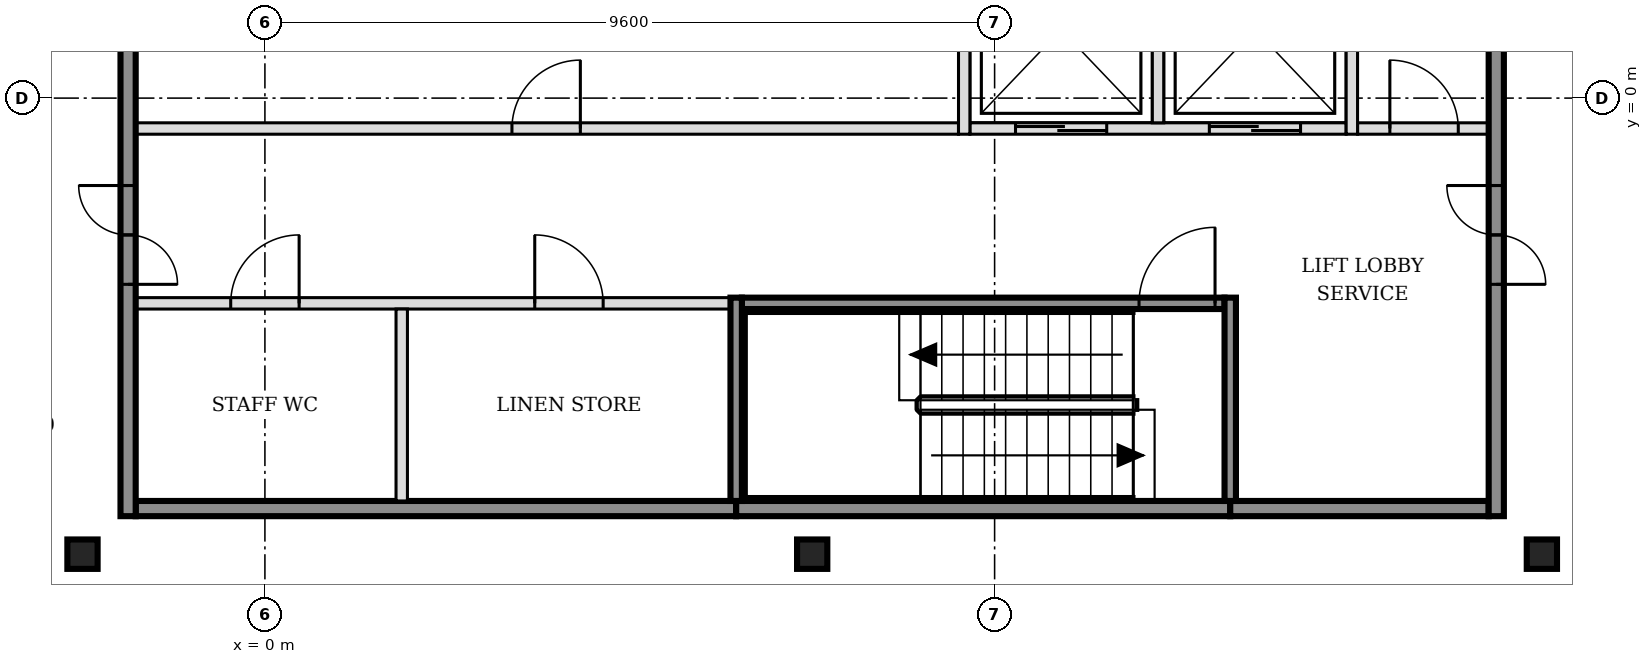
"""IFC4 building model, lengths in metres.
Left out: names, types, materials, properties, quantities, classifications, styles, units other than length and angle.
Written with IfcOpenShell. Run it as: python <this file> out.ifc"""

import sys

from ifc_helpers import new_model, si_unit, direction, frame, frame_2d, origin, origin_2d, place, context, subcontext, project, spatial, rectangle, i_section, extrude, element, fill, save


model = new_model("IFC4")
c1 = context("Model", 3, precision=1e-05, world=origin(), true_north=direction((0.0, 1.0)))
c2 = subcontext(c1, "Body", "Model", "MODEL_VIEW")
j1 = project(units=[si_unit("LENGTHUNIT", "METRE"), si_unit("PLANEANGLEUNIT", "RADIAN")], contexts=[c1])
p1 = place(None, origin())
s1 = spatial("IfcSite", under=j1, at=p1, CompositionType="ELEMENT")
p2 = place(p1, origin())
s2 = spatial("IfcBuilding", under=s1, at=p2, CompositionType="ELEMENT")
p3 = place(p2, frame((0.0, 0.0, 292.2)))
s3 = spatial("IfcBuildingStorey", under=s2, at=p3, CompositionType="ELEMENT", Elevation=292.2)
for number, where, z_axis, x_axis in (
    (1, (-2.4, -6.0, -0.15), (0.0, 0.0, 1.0), (1.0, 0.0, 0.0)),
    (2, (7.2, -6.0, -0.15), (0.0, 0.0, 1.0), (1.0, 0.0, 0.0)),
    (3, (16.8, -6.0, -0.15), (0.0, 0.0, 1.0), (1.0, 0.0, 0.0)),
):
    element("IfcColumn", number, at=place(p3, frame(where, z_axis=z_axis, x_axis=x_axis)), inside=s3, PredefinedType="COLUMN", context=c2, shape_type="SweptSolid", body=[
        extrude(i_section(OverallWidth=0.398, OverallDepth=0.387, WebThickness=0.021, FlangeThickness=0.033, FilletRadius=0.015, at=origin_2d()), origin(), (0.0, 0.0, 1.0), 3.55),
    ])
p4 = place(p3, frame((-1.7, -5.4, 0.0), z_axis=(0.0, 0.0, 1.0), x_axis=(1.0, 0.0, 0.0)))
e4 = element("IfcWall", 4, at=p4, inside=s3, PredefinedType="SOLIDWALL", context=c2, shape_type="SweptSolid", body=[
    extrude(rectangle(XDim=7.9, YDim=0.2, at=frame_2d((3.95, 0.0))), origin(), (0.0, 0.0, 1.0), 3.4),
])
p5 = place(p3, frame((6.2, -5.4, 0.0), z_axis=(0.0, 0.0, 1.0), x_axis=(1.0, 0.0, 0.0)))
e5 = element("IfcWall", 5, at=p5, inside=s3, PredefinedType="SOLIDWALL", context=c2, shape_type="SweptSolid", body=[
    extrude(rectangle(XDim=6.5, YDim=0.2, at=frame_2d((3.25, 0.0))), origin(), (0.0, 0.0, 1.0), 3.4),
])
p6 = place(p3, frame((12.7, -5.4, 0.0), z_axis=(0.0, 0.0, 1.0), x_axis=(1.0, 0.0, 0.0)))
e6 = element("IfcWall", 6, at=p6, inside=s3, PredefinedType="SOLIDWALL", context=c2, shape_type="SweptSolid", body=[
    extrude(rectangle(XDim=3.4, YDim=0.2, at=frame_2d((1.7, 0.0))), origin(), (0.0, 0.0, 1.0), 3.4),
])
p7 = place(p3, frame((-1.7, -2.7, 0.0), z_axis=(0.0, 0.0, 1.0), x_axis=(1.0, 0.0, 0.0)))
e7 = element("IfcWall", 7, at=p7, inside=s3, PredefinedType="PARTITIONING", context=c2, shape_type="SweptSolid", body=[
    extrude(rectangle(XDim=7.825, YDim=0.15, at=frame_2d((3.913, 0.0))), origin(), (0.0, 0.0, 1.0), 3.4),
])
p8 = place(p7, frame((1.25, 0.0, 0.0)))
e8 = element("IfcOpeningElement", 8, at=p8, cuts=e7, PredefinedType="OPENING", context=c2, shape_type="SweptSolid", body=[
    extrude(rectangle(XDim=0.9, YDim=2.1, at=frame_2d((0.45, 1.05))), frame((0.0, 0.085, 0.0), z_axis=(0.0, -1.0, 0.0), x_axis=(1.0, 0.0, 0.0)), (0.0, 0.0, 1.0), 0.17),
])
p9 = place(p7, frame((5.25, 0.0, 0.0)))
e9 = element("IfcOpeningElement", 9, at=p9, cuts=e7, PredefinedType="OPENING", context=c2, shape_type="SweptSolid", body=[
    extrude(rectangle(XDim=0.9, YDim=2.1, at=frame_2d((0.45, 1.05))), frame((0.0, 0.085, 0.0), z_axis=(0.0, -1.0, 0.0), x_axis=(1.0, 0.0, 0.0)), (0.0, 0.0, 1.0), 0.17),
])
p10 = place(p3, frame((6.275, -2.7, 0.0), z_axis=(0.0, 0.0, 1.0), x_axis=(1.0, 0.0, 0.0)))
e10 = element("IfcWall", 10, at=p10, inside=s3, PredefinedType="SOLIDWALL", context=c2, shape_type="SweptSolid", body=[
    extrude(rectangle(XDim=6.35, YDim=0.15, at=frame_2d((3.175, 0.0))), origin(), (0.0, 0.0, 1.0), 3.4),
])
p11 = place(p10, frame((5.225, 0.0, 0.0)))
e11 = element("IfcOpeningElement", 11, at=p11, cuts=e10, PredefinedType="OPENING", context=c2, shape_type="SweptSolid", body=[
    extrude(rectangle(XDim=1.0, YDim=2.1, at=frame_2d((0.5, 1.05))), frame((0.0, 0.085, 0.0), z_axis=(0.0, -1.0, 0.0), x_axis=(1.0, 0.0, 0.0)), (0.0, 0.0, 1.0), 0.17),
])
p12 = place(p3, frame((-1.7, -0.4, 0.0), z_axis=(0.0, 0.0, 1.0), x_axis=(1.0, 0.0, 0.0)))
e12 = element("IfcWall", 12, at=p12, inside=s3, PredefinedType="PARTITIONING", context=c2, shape_type="SweptSolid", body=[
    extrude(rectangle(XDim=10.825, YDim=0.15, at=frame_2d((5.413, 0.0))), origin(), (0.0, 0.0, 1.0), 3.4),
])
p13 = place(p12, frame((4.95, 0.0, 0.0)))
e13 = element("IfcOpeningElement", 13, at=p13, cuts=e12, PredefinedType="OPENING", context=c2, shape_type="SweptSolid", body=[
    extrude(rectangle(XDim=0.9, YDim=2.1, at=frame_2d((0.45, 1.05))), frame((0.0, 0.085, 0.0), z_axis=(0.0, -1.0, 0.0), x_axis=(1.0, 0.0, 0.0)), (0.0, 0.0, 1.0), 0.17),
])
p14 = place(p3, frame((9.275, -0.4, 0.0), z_axis=(0.0, 0.0, 1.0), x_axis=(1.0, 0.0, 0.0)))
e14 = element("IfcWall", 14, at=p14, inside=s3, PredefinedType="SOLIDWALL", context=c2, shape_type="SweptSolid", body=[
    extrude(rectangle(XDim=4.95, YDim=0.15, at=frame_2d((2.475, 0.0))), origin(), (0.0, 0.0, 1.0), 3.4),
])
p15 = place(p14, frame((0.6, 0.0, 0.0)))
e15 = element("IfcOpeningElement", 15, at=p15, cuts=e14, PredefinedType="OPENING", context=c2, shape_type="SweptSolid", body=[
    extrude(rectangle(XDim=1.2, YDim=2.1, at=frame_2d((0.6, 1.05))), frame((0.0, 0.085, 0.0), z_axis=(0.0, -1.0, 0.0), x_axis=(1.0, 0.0, 0.0)), (0.0, 0.0, 1.0), 0.17),
])
p16 = place(p14, frame((3.15, 0.0, 0.0)))
e16 = element("IfcOpeningElement", 16, at=p16, cuts=e14, PredefinedType="OPENING", context=c2, shape_type="SweptSolid", body=[
    extrude(rectangle(XDim=1.2, YDim=2.1, at=frame_2d((0.6, 1.05))), frame((0.0, 0.085, 0.0), z_axis=(0.0, -1.0, 0.0), x_axis=(1.0, 0.0, 0.0)), (0.0, 0.0, 1.0), 0.17),
])
p17 = place(p3, frame((14.375, -0.4, 0.0), z_axis=(0.0, 0.0, 1.0), x_axis=(1.0, 0.0, 0.0)))
e17 = element("IfcWall", 17, at=p17, inside=s3, PredefinedType="PARTITIONING", context=c2, shape_type="SweptSolid", body=[
    extrude(rectangle(XDim=1.725, YDim=0.15, at=frame_2d((0.863, 0.0))), origin(), (0.0, 0.0, 1.0), 3.4),
])
p18 = place(p17, frame((0.425, 0.0, 0.0)))
e18 = element("IfcOpeningElement", 18, at=p18, cuts=e17, PredefinedType="OPENING", context=c2, shape_type="SweptSolid", body=[
    extrude(rectangle(XDim=0.9, YDim=2.1, at=frame_2d((0.45, 1.05))), frame((0.0, 0.085, 0.0), z_axis=(0.0, -1.0, 0.0), x_axis=(1.0, 0.0, 0.0)), (0.0, 0.0, 1.0), 0.17),
])
p19 = place(p3, frame((-1.8, -5.5, 0.0), z_axis=(0.0, 0.0, 1.0), x_axis=(0.0, 1.0, 0.0)))
e19 = element("IfcWall", 19, at=p19, inside=s3, PredefinedType="SOLIDWALL", context=c2, shape_type="SweptSolid", body=[
    extrude(rectangle(XDim=15.8, YDim=0.2, at=frame_2d((7.9, 0.0))), origin(), (0.0, 0.0, 1.0), 3.4),
])
p20 = place(p19, frame((3.05, 0.0, 0.0)))
e20 = element("IfcOpeningElement", 20, at=p20, cuts=e19, PredefinedType="OPENING", context=c2, shape_type="SweptSolid", body=[
    extrude(rectangle(XDim=1.3, YDim=2.1, at=frame_2d((0.65, 1.05))), frame((0.0, 0.11, 0.0), z_axis=(0.0, -1.0, 0.0), x_axis=(1.0, 0.0, 0.0)), (0.0, 0.0, 1.0), 0.22),
])
p21 = place(p19, frame((11.45, 0.0, 0.0)))
e21 = element("IfcOpeningElement", 21, at=p21, cuts=e19, PredefinedType="OPENING", context=c2, shape_type="SweptSolid", body=[
    extrude(rectangle(XDim=1.3, YDim=2.1, at=frame_2d((0.65, 1.05))), frame((0.0, 0.11, 0.0), z_axis=(0.0, -1.0, 0.0), x_axis=(1.0, 0.0, 0.0)), (0.0, 0.0, 1.0), 0.22),
])
p22 = place(p3, frame((1.8, -5.3, 0.0), z_axis=(0.0, 0.0, 1.0), x_axis=(0.0, 1.0, 0.0)))
e22 = element("IfcWall", 22, at=p22, inside=s3, PredefinedType="PARTITIONING", context=c2, shape_type="SweptSolid", body=[
    extrude(rectangle(XDim=2.525, YDim=0.15, at=frame_2d((1.263, 0.0))), origin(), (0.0, 0.0, 1.0), 3.4),
])
p23 = place(p3, frame((6.2, -5.3, 0.0), z_axis=(0.0, 0.0, 1.0), x_axis=(0.0, 1.0, 0.0)))
e23 = element("IfcWall", 23, at=p23, inside=s3, PredefinedType="SOLIDWALL", context=c2, shape_type="SweptSolid", body=[
    extrude(rectangle(XDim=2.675, YDim=0.15, at=frame_2d((1.337, 0.0))), origin(), (0.0, 0.0, 1.0), 3.4),
])
p24 = place(p3, frame((9.2, -0.475, 0.0), z_axis=(0.0, 0.0, 1.0), x_axis=(0.0, 1.0, 0.0)))
e24 = element("IfcWall", 24, at=p24, inside=s3, PredefinedType="SOLIDWALL", context=c2, shape_type="SweptSolid", body=[
    extrude(rectangle(XDim=2.6, YDim=0.15, at=frame_2d((1.3, 0.0))), origin(), (0.0, 0.0, 1.0), 3.4),
])
p25 = place(p3, frame((11.75, -0.325, 0.0), z_axis=(0.0, 0.0, 1.0), x_axis=(0.0, 1.0, 0.0)))
e25 = element("IfcWall", 25, at=p25, inside=s3, PredefinedType="SOLIDWALL", context=c2, shape_type="SweptSolid", body=[
    extrude(rectangle(XDim=2.45, YDim=0.15, at=frame_2d((1.225, 0.0))), origin(), (0.0, 0.0, 1.0), 3.4),
])
p26 = place(p3, frame((12.7, -5.3, 0.0), z_axis=(0.0, 0.0, 1.0), x_axis=(0.0, 1.0, 0.0)))
e26 = element("IfcWall", 26, at=p26, inside=s3, PredefinedType="SOLIDWALL", context=c2, shape_type="SweptSolid", body=[
    extrude(rectangle(XDim=2.675, YDim=0.15, at=frame_2d((1.337, 0.0))), origin(), (0.0, 0.0, 1.0), 3.4),
])
p27 = place(p3, frame((14.3, -0.475, 0.0), z_axis=(0.0, 0.0, 1.0), x_axis=(0.0, 1.0, 0.0)))
e27 = element("IfcWall", 27, at=p27, inside=s3, PredefinedType="SOLIDWALL", context=c2, shape_type="SweptSolid", body=[
    extrude(rectangle(XDim=2.75, YDim=0.15, at=frame_2d((1.375, 0.0))), origin(), (0.0, 0.0, 1.0), 3.4),
])
p28 = place(p3, frame((16.2, -5.5, 0.0), z_axis=(0.0, 0.0, 1.0), x_axis=(0.0, 1.0, 0.0)))
e28 = element("IfcWall", 28, at=p28, inside=s3, PredefinedType="SOLIDWALL", context=c2, shape_type="SweptSolid", body=[
    extrude(rectangle(XDim=15.8, YDim=0.2, at=frame_2d((7.9, 0.0))), origin(), (0.0, 0.0, 1.0), 3.4),
])
p29 = place(p28, frame((3.05, 0.0, 0.0)))
e29 = element("IfcOpeningElement", 29, at=p29, cuts=e28, PredefinedType="OPENING", context=c2, shape_type="SweptSolid", body=[
    extrude(rectangle(XDim=1.3, YDim=2.1, at=frame_2d((0.65, 1.05))), frame((0.0, 0.11, 0.0), z_axis=(0.0, -1.0, 0.0), x_axis=(1.0, 0.0, 0.0)), (0.0, 0.0, 1.0), 0.22),
])
p30 = place(p28, frame((11.45, 0.0, 0.0)))
e30 = element("IfcOpeningElement", 30, at=p30, cuts=e28, PredefinedType="OPENING", context=c2, shape_type="SweptSolid", body=[
    extrude(rectangle(XDim=1.3, YDim=2.1, at=frame_2d((0.65, 1.05))), frame((0.0, 0.11, 0.0), z_axis=(0.0, -1.0, 0.0), x_axis=(1.0, 0.0, 0.0)), (0.0, 0.0, 1.0), 0.22),
])
p31 = place(p3, frame((16.722, -14.272, 0.0), z_axis=(0.0, 0.0, 1.0), x_axis=(0.707106781187, 0.707106781187, 0.0)))
e31 = element("IfcWall", 31, at=p31, inside=s3, PredefinedType="PARTITIONING", context=c2, shape_type="SweptSolid", body=[
    extrude(rectangle(XDim=20.058, YDim=0.15, at=frame_2d((10.029, 0.0))), origin(), (0.0, 0.0, 1.0), 2.68),
])
p32 = place(p31, frame((3.195, 0.0, 0.0)))
e32 = element("IfcOpeningElement", 32, at=p32, cuts=e31, PredefinedType="OPENING", context=c2, shape_type="SweptSolid", body=[
    extrude(rectangle(XDim=0.9, YDim=2.1, at=frame_2d((0.45, 1.05))), frame((0.0, 0.085, 0.0), z_axis=(0.0, -1.0, 0.0), x_axis=(1.0, 0.0, 0.0)), (0.0, 0.0, 1.0), 0.17),
])
p33 = place(p31, frame((9.193, 0.0, 0.0)))
e33 = element("IfcOpeningElement", 33, at=p33, cuts=e31, PredefinedType="OPENING", context=c2, shape_type="SweptSolid", body=[
    extrude(rectangle(XDim=0.9, YDim=2.1, at=frame_2d((0.45, 1.05))), frame((0.0, 0.085, 0.0), z_axis=(0.0, -1.0, 0.0), x_axis=(1.0, 0.0, 0.0)), (0.0, 0.0, 1.0), 0.17),
])
p34 = place(p31, frame((17.613, 0.0, 0.0)))
e34 = element("IfcOpeningElement", 34, at=p34, cuts=e31, PredefinedType="OPENING", context=c2, shape_type="SweptSolid", body=[
    extrude(rectangle(XDim=0.9, YDim=2.1, at=frame_2d((0.45, 1.05))), frame((0.0, 0.085, 0.0), z_axis=(0.0, -1.0, 0.0), x_axis=(1.0, 0.0, 0.0)), (0.0, 0.0, 1.0), 0.17),
])
p35 = place(p15, origin())
e35 = element("IfcDoor", 35, at=p35, inside=s3, OperationType="DOUBLE_DOOR_SLIDING", PredefinedType="DOOR", context=c2, shape_type="SweptSolid", body=[
    extrude(rectangle(XDim=1.2, YDim=2.1, at=frame_2d((0.6, 1.05))), frame((0.0, 0.025, 0.0), z_axis=(0.0, -1.0, 0.0), x_axis=(1.0, 0.0, 0.0)), (0.0, 0.0, 1.0), 0.05),
])
fill(e15, e35)
p36 = place(p16, origin())
e36 = element("IfcDoor", 36, at=p36, inside=s3, OperationType="DOUBLE_DOOR_SLIDING", PredefinedType="DOOR", context=c2, shape_type="SweptSolid", body=[
    extrude(rectangle(XDim=1.2, YDim=2.1, at=frame_2d((0.6, 1.05))), frame((0.0, 0.025, 0.0), z_axis=(0.0, -1.0, 0.0), x_axis=(1.0, 0.0, 0.0)), (0.0, 0.0, 1.0), 0.05),
])
fill(e16, e36)
p37 = place(p11, origin())
e37 = element("IfcDoor", 37, at=p37, inside=s3, OperationType="SINGLE_SWING_RIGHT", PredefinedType="DOOR", context=c2, shape_type="SweptSolid", body=[
    extrude(rectangle(XDim=1.0, YDim=2.1, at=frame_2d((0.5, 1.05))), frame((0.0, 0.025, 0.0), z_axis=(0.0, -1.0, 0.0), x_axis=(1.0, 0.0, 0.0)), (0.0, 0.0, 1.0), 0.05),
])
fill(e11, e37)
p38 = place(p20, origin())
e38 = element("IfcDoor", 38, at=p38, inside=s3, OperationType="DOUBLE_DOOR_SINGLE_SWING", PredefinedType="DOOR", context=c2, shape_type="SweptSolid", body=[
    extrude(rectangle(XDim=1.3, YDim=2.1, at=frame_2d((0.65, 1.05))), frame((0.0, 0.025, 0.0), z_axis=(0.0, -1.0, 0.0), x_axis=(1.0, 0.0, 0.0)), (0.0, 0.0, 1.0), 0.05),
])
fill(e20, e38)
p39 = place(p29, origin())
e39 = element("IfcDoor", 39, at=p39, inside=s3, OperationType="DOUBLE_DOOR_SINGLE_SWING", PredefinedType="DOOR", context=c2, shape_type="SweptSolid", body=[
    extrude(rectangle(XDim=1.3, YDim=2.1, at=frame_2d((0.65, 1.05))), frame((0.0, 0.025, 0.0), z_axis=(0.0, -1.0, 0.0), x_axis=(1.0, 0.0, 0.0)), (0.0, 0.0, 1.0), 0.05),
])
fill(e29, e39)
p40 = place(p18, origin())
e40 = element("IfcDoor", 40, at=p40, inside=s3, OperationType="SINGLE_SWING_LEFT", PredefinedType="DOOR", context=c2, shape_type="SweptSolid", body=[
    extrude(rectangle(XDim=0.9, YDim=2.1, at=frame_2d((0.45, 1.05))), frame((0.0, 0.025, 0.0), z_axis=(0.0, -1.0, 0.0), x_axis=(1.0, 0.0, 0.0)), (0.0, 0.0, 1.0), 0.05),
])
fill(e18, e40)
p41 = place(p8, origin())
e41 = element("IfcDoor", 41, at=p41, inside=s3, OperationType="SINGLE_SWING_RIGHT", PredefinedType="DOOR", context=c2, shape_type="SweptSolid", body=[
    extrude(rectangle(XDim=0.9, YDim=2.1, at=frame_2d((0.45, 1.05))), frame((0.0, 0.025, 0.0), z_axis=(0.0, -1.0, 0.0), x_axis=(1.0, 0.0, 0.0)), (0.0, 0.0, 1.0), 0.05),
])
fill(e8, e41)
p42 = place(p9, origin())
e42 = element("IfcDoor", 42, at=p42, inside=s3, OperationType="SINGLE_SWING_LEFT", PredefinedType="DOOR", context=c2, shape_type="SweptSolid", body=[
    extrude(rectangle(XDim=0.9, YDim=2.1, at=frame_2d((0.45, 1.05))), frame((0.0, 0.025, 0.0), z_axis=(0.0, -1.0, 0.0), x_axis=(1.0, 0.0, 0.0)), (0.0, 0.0, 1.0), 0.05),
])
fill(e9, e42)
p43 = place(p13, origin())
e43 = element("IfcDoor", 43, at=p43, inside=s3, OperationType="SINGLE_SWING_RIGHT", PredefinedType="DOOR", context=c2, shape_type="SweptSolid", body=[
    extrude(rectangle(XDim=0.9, YDim=2.1, at=frame_2d((0.45, 1.05))), frame((0.0, 0.025, 0.0), z_axis=(0.0, -1.0, 0.0), x_axis=(1.0, 0.0, 0.0)), (0.0, 0.0, 1.0), 0.05),
])
fill(e13, e43)
save(model, sys.argv[1])
